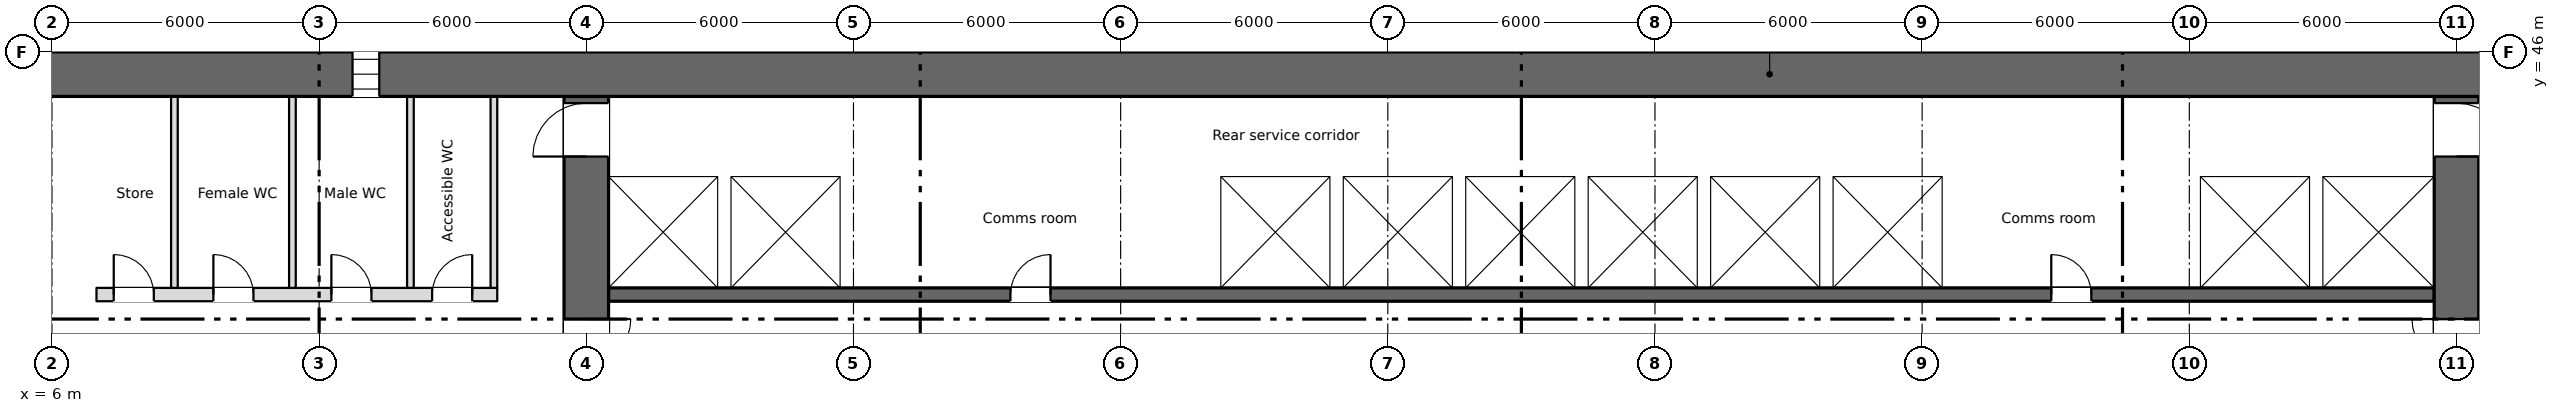
"""IFC4 building model, lengths in metres.
Left out: names, types, materials, properties, quantities, classifications, styles, units other than length and angle.
Written with IfcOpenShell. Run it as: python <this file> out.ifc"""

import sys

from ifc_helpers import new_model, si_unit, direction, frame, frame_2d, origin, place, context, subcontext, project, spatial, rectangle, extrude, element, fill, save


model = new_model("IFC4")
c1 = context("Model", 3, precision=1e-05, world=origin(), true_north=direction((0.0, 1.0)))
c2 = subcontext(c1, "Body", "Model", "MODEL_VIEW")
j1 = project(units=[si_unit("LENGTHUNIT", "METRE"), si_unit("PLANEANGLEUNIT", "RADIAN")], contexts=[c1])
p1 = place(None, origin())
s1 = spatial("IfcSite", under=j1, at=p1, CompositionType="ELEMENT")
p2 = place(p1, origin())
s2 = spatial("IfcBuilding", under=s1, at=p2, CompositionType="ELEMENT")
p3 = place(p2, frame((0.0, 0.0, 30.0)))
s3 = spatial("IfcBuildingStorey", under=s2, at=p3, CompositionType="ELEMENT", Elevation=30.0)
p4 = place(p3, frame((5.55, 45.5, 0.0), z_axis=(0.0, 0.0, 1.0), x_axis=(1.0, 0.0, 0.0)))
e1 = element("IfcWall", 1, at=p4, inside=s3, PredefinedType="SHEAR", context=c2, shape_type="SweptSolid", body=[
    extrude(rectangle(XDim=66.9, YDim=1.0, at=frame_2d((33.45, 0.0))), origin(), (0.0, 0.0, 1.0), 3.35),
])
p5 = place(p4, frame((7.2, 0.0, 0.6)))
e2 = element("IfcOpeningElement", 2, at=p5, cuts=e1, PredefinedType="OPENING", context=c2, shape_type="SweptSolid", body=[
    extrude(rectangle(XDim=0.6, YDim=2.4, at=frame_2d((0.3, 1.2))), frame((0.0, 0.51, 0.0), z_axis=(0.0, -1.0, 0.0), x_axis=(1.0, 0.0, 0.0)), (0.0, 0.0, 1.0), 1.02),
])
p6 = place(p4, frame((61.2, 0.0, 0.6)))
e3 = element("IfcOpeningElement", 3, at=p6, cuts=e1, PredefinedType="OPENING", context=c2, shape_type="SweptSolid", body=[
    extrude(rectangle(XDim=0.6, YDim=2.4, at=frame_2d((0.3, 1.2))), frame((0.0, 0.51, 0.0), z_axis=(0.0, -1.0, 0.0), x_axis=(1.0, 0.0, 0.0)), (0.0, 0.0, 1.0), 1.02),
])
p7 = place(p3, frame((6.85, 28.4, 0.0), z_axis=(0.0, 0.0, 1.0), x_axis=(0.0, 1.0, 0.0)))
e4 = element("IfcWall", 4, at=p7, inside=s3, PredefinedType="SHEAR", context=c2, shape_type="SweptSolid", body=[
    extrude(rectangle(XDim=16.6, YDim=0.3, at=frame_2d((8.3, 0.0))), origin(), (0.0, 0.0, 1.0), 3.35),
])
p8 = place(p3, frame((18.0, 28.4, 0.0), z_axis=(0.0, 0.0, 1.0), x_axis=(0.0, 1.0, 0.0)))
e5 = element("IfcWall", 5, at=p8, inside=s3, PredefinedType="SHEAR", context=c2, shape_type="SweptSolid", body=[
    extrude(rectangle(XDim=16.6, YDim=1.0, at=frame_2d((8.3, 0.0))), origin(), (0.0, 0.0, 1.0), 3.35),
])
p9 = place(p8, frame((9.6, 0.0, 0.0)))
e6 = element("IfcOpeningElement", 6, at=p9, cuts=e5, PredefinedType="OPENING", context=c2, shape_type="SweptSolid", body=[
    extrude(rectangle(XDim=2.0, YDim=2.1, at=frame_2d((1.0, 1.05))), frame((0.0, 0.51, 0.0), z_axis=(0.0, -1.0, 0.0), x_axis=(1.0, 0.0, 0.0)), (0.0, 0.0, 1.0), 1.02),
])
p10 = place(p8, frame((15.25, 0.0, 0.0)))
e7 = element("IfcOpeningElement", 7, at=p10, cuts=e5, PredefinedType="OPENING", context=c2, shape_type="SweptSolid", body=[
    extrude(rectangle(XDim=1.2, YDim=2.1, at=frame_2d((0.6, 1.05))), frame((0.0, 0.51, 0.0), z_axis=(0.0, -1.0, 0.0), x_axis=(1.0, 0.0, 0.0)), (0.0, 0.0, 1.0), 1.02),
])
p11 = place(p3, frame((60.0, 28.4, 0.0), z_axis=(0.0, 0.0, 1.0), x_axis=(0.0, 1.0, 0.0)))
e8 = element("IfcWall", 8, at=p11, inside=s3, PredefinedType="SHEAR", context=c2, shape_type="SweptSolid", body=[
    extrude(rectangle(XDim=16.6, YDim=1.0, at=frame_2d((8.3, 0.0))), origin(), (0.0, 0.0, 1.0), 3.35),
])
p12 = place(p11, frame((9.6, 0.0, 0.0)))
e9 = element("IfcOpeningElement", 9, at=p12, cuts=e8, PredefinedType="OPENING", context=c2, shape_type="SweptSolid", body=[
    extrude(rectangle(XDim=2.0, YDim=2.1, at=frame_2d((1.0, 1.05))), frame((0.0, 0.51, 0.0), z_axis=(0.0, -1.0, 0.0), x_axis=(1.0, 0.0, 0.0)), (0.0, 0.0, 1.0), 1.02),
])
p13 = place(p11, frame((15.25, 0.0, 0.0)))
e10 = element("IfcOpeningElement", 10, at=p13, cuts=e8, PredefinedType="OPENING", context=c2, shape_type="SweptSolid", body=[
    extrude(rectangle(XDim=1.2, YDim=2.1, at=frame_2d((0.6, 1.05))), frame((0.0, 0.51, 0.0), z_axis=(0.0, -1.0, 0.0), x_axis=(1.0, 0.0, 0.0)), (0.0, 0.0, 1.0), 1.02),
])
p14 = place(p3, frame((18.5, 40.55, 0.0), z_axis=(0.0, 0.0, 1.0), x_axis=(1.0, 0.0, 0.0)))
e11 = element("IfcWall", 11, at=p14, inside=s3, PredefinedType="SHEAR", context=c2, shape_type="SweptSolid", body=[
    extrude(rectangle(XDim=41.0, YDim=0.3, at=frame_2d((20.5, 0.0))), origin(), (0.0, 0.0, 1.0), 3.35),
])
p15 = place(p14, frame((9.025, 0.0, 0.0)))
e12 = element("IfcOpeningElement", 12, at=p15, cuts=e11, PredefinedType="OPENING", context=c2, shape_type="SweptSolid", body=[
    extrude(rectangle(XDim=0.9, YDim=2.1, at=frame_2d((0.45, 1.05))), frame((0.0, 0.16, 0.0), z_axis=(0.0, -1.0, 0.0), x_axis=(1.0, 0.0, 0.0)), (0.0, 0.0, 1.0), 0.32),
])
p16 = place(p14, frame((32.4, 0.0, 0.0)))
e13 = element("IfcOpeningElement", 13, at=p16, cuts=e11, PredefinedType="OPENING", context=c2, shape_type="SweptSolid", body=[
    extrude(rectangle(XDim=0.9, YDim=2.1, at=frame_2d((0.45, 1.05))), frame((0.0, 0.16, 0.0), z_axis=(0.0, -1.0, 0.0), x_axis=(1.0, 0.0, 0.0)), (0.0, 0.0, 1.0), 0.32),
])
p17 = place(p14, frame((14.425, 0.0, 0.0)))
e14 = element("IfcOpeningElement", 14, at=p17, cuts=e11, PredefinedType="OPENING", context=c2, shape_type="SweptSolid", body=[
    extrude(rectangle(XDim=1.1, YDim=2.1, at=frame_2d((0.55, 1.05))), frame((0.0, 0.16, 0.0), z_axis=(0.0, -1.0, 0.0), x_axis=(1.0, 0.0, 0.0)), (0.0, 0.0, 1.0), 0.32),
])
p18 = place(p14, frame((17.175, 0.0, 0.0)))
e15 = element("IfcOpeningElement", 15, at=p18, cuts=e11, PredefinedType="OPENING", context=c2, shape_type="SweptSolid", body=[
    extrude(rectangle(XDim=1.1, YDim=2.1, at=frame_2d((0.55, 1.05))), frame((0.0, 0.16, 0.0), z_axis=(0.0, -1.0, 0.0), x_axis=(1.0, 0.0, 0.0)), (0.0, 0.0, 1.0), 0.32),
])
p19 = place(p14, frame((19.925, 0.0, 0.0)))
e16 = element("IfcOpeningElement", 16, at=p19, cuts=e11, PredefinedType="OPENING", context=c2, shape_type="SweptSolid", body=[
    extrude(rectangle(XDim=1.1, YDim=2.1, at=frame_2d((0.55, 1.05))), frame((0.0, 0.16, 0.0), z_axis=(0.0, -1.0, 0.0), x_axis=(1.0, 0.0, 0.0)), (0.0, 0.0, 1.0), 0.32),
])
p20 = place(p14, frame((22.675, 0.0, 0.0)))
e17 = element("IfcOpeningElement", 17, at=p20, cuts=e11, PredefinedType="OPENING", context=c2, shape_type="SweptSolid", body=[
    extrude(rectangle(XDim=1.1, YDim=2.1, at=frame_2d((0.55, 1.05))), frame((0.0, 0.16, 0.0), z_axis=(0.0, -1.0, 0.0), x_axis=(1.0, 0.0, 0.0)), (0.0, 0.0, 1.0), 0.32),
])
p21 = place(p14, frame((36.375, 0.0, 0.0)))
e18 = element("IfcOpeningElement", 18, at=p21, cuts=e11, PredefinedType="OPENING", context=c2, shape_type="SweptSolid", body=[
    extrude(rectangle(XDim=1.2, YDim=2.1, at=frame_2d((0.6, 1.05))), frame((0.0, 0.16, 0.0), z_axis=(0.0, -1.0, 0.0), x_axis=(1.0, 0.0, 0.0)), (0.0, 0.0, 1.0), 0.32),
])
p22 = place(p14, frame((39.15, 0.0, 0.0)))
e19 = element("IfcOpeningElement", 19, at=p22, cuts=e11, PredefinedType="OPENING", context=c2, shape_type="SweptSolid", body=[
    extrude(rectangle(XDim=1.2, YDim=2.1, at=frame_2d((0.6, 1.05))), frame((0.0, 0.16, 0.0), z_axis=(0.0, -1.0, 0.0), x_axis=(1.0, 0.0, 0.0)), (0.0, 0.0, 1.0), 0.32),
])
p23 = place(p3, frame((18.5, 43.35, 0.0), z_axis=(0.0, 0.0, 1.0), x_axis=(1.0, 0.0, 0.0)))
e20 = element("IfcWall", 20, at=p23, inside=s3, PredefinedType="SHEAR", context=c2, shape_type="SweptSolid", body=[
    extrude(rectangle(XDim=41.0, YDim=0.3, at=frame_2d((20.5, 0.0))), origin(), (0.0, 0.0, 1.0), 3.35),
])
p24 = place(p3, frame((7.0, 40.55, 0.0), z_axis=(0.0, 0.0, 1.0), x_axis=(1.0, 0.0, 0.0)))
e21 = element("IfcWall", 21, at=p24, inside=s3, PredefinedType="PARTITIONING", context=c2, shape_type="SweptSolid", body=[
    extrude(rectangle(XDim=9.0, YDim=0.3, at=frame_2d((4.5, 0.0))), origin(), (0.0, 0.0, 1.0), 3.35),
])
p25 = place(p24, frame((0.387, 0.0, 0.0)))
e22 = element("IfcOpeningElement", 22, at=p25, cuts=e21, PredefinedType="OPENING", context=c2, shape_type="SweptSolid", body=[
    extrude(rectangle(XDim=0.9, YDim=2.1, at=frame_2d((0.45, 1.05))), frame((0.0, 0.16, 0.0), z_axis=(0.0, -1.0, 0.0), x_axis=(1.0, 0.0, 0.0)), (0.0, 0.0, 1.0), 0.32),
])
p26 = place(p24, frame((2.625, 0.0, 0.0)))
e23 = element("IfcOpeningElement", 23, at=p26, cuts=e21, PredefinedType="OPENING", context=c2, shape_type="SweptSolid", body=[
    extrude(rectangle(XDim=0.9, YDim=2.1, at=frame_2d((0.45, 1.05))), frame((0.0, 0.16, 0.0), z_axis=(0.0, -1.0, 0.0), x_axis=(1.0, 0.0, 0.0)), (0.0, 0.0, 1.0), 0.32),
])
p27 = place(p24, frame((5.275, 0.0, 0.0)))
e24 = element("IfcOpeningElement", 24, at=p27, cuts=e21, PredefinedType="OPENING", context=c2, shape_type="SweptSolid", body=[
    extrude(rectangle(XDim=0.9, YDim=2.1, at=frame_2d((0.45, 1.05))), frame((0.0, 0.16, 0.0), z_axis=(0.0, -1.0, 0.0), x_axis=(1.0, 0.0, 0.0)), (0.0, 0.0, 1.0), 0.32),
])
p28 = place(p24, frame((7.538, 0.0, 0.0)))
e25 = element("IfcOpeningElement", 25, at=p28, cuts=e21, PredefinedType="OPENING", context=c2, shape_type="SweptSolid", body=[
    extrude(rectangle(XDim=0.9, YDim=2.1, at=frame_2d((0.45, 1.05))), frame((0.0, 0.16, 0.0), z_axis=(0.0, -1.0, 0.0), x_axis=(1.0, 0.0, 0.0)), (0.0, 0.0, 1.0), 0.32),
])
for number, where, z_axis, x_axis in (
    (26, (21.1, 40.7, 0.0), (0.0, 0.0, 1.0), (0.0, 1.0, 0.0)),
    (27, (23.85, 40.7, 0.0), (0.0, 0.0, 1.0), (0.0, 1.0, 0.0)),
    (28, (32.1, 40.7, 0.0), (0.0, 0.0, 1.0), (0.0, 1.0, 0.0)),
    (29, (34.85, 40.7, 0.0), (0.0, 0.0, 1.0), (0.0, 1.0, 0.0)),
    (30, (37.6, 40.7, 0.0), (0.0, 0.0, 1.0), (0.0, 1.0, 0.0)),
    (31, (40.35, 40.7, 0.0), (0.0, 0.0, 1.0), (0.0, 1.0, 0.0)),
    (32, (43.1, 40.7, 0.0), (0.0, 0.0, 1.0), (0.0, 1.0, 0.0)),
    (33, (45.85, 40.7, 0.0), (0.0, 0.0, 1.0), (0.0, 1.0, 0.0)),
    (34, (48.6, 40.7, 0.0), (0.0, 0.0, 1.0), (0.0, 1.0, 0.0)),
    (35, (54.1, 40.7, 0.0), (0.0, 0.0, 1.0), (0.0, 1.0, 0.0)),
    (36, (56.85, 40.7, 0.0), (0.0, 0.0, 1.0), (0.0, 1.0, 0.0)),
):
    element("IfcWall", number, at=place(p3, frame(where, z_axis=z_axis, x_axis=x_axis)), inside=s3, PredefinedType="SHEAR", context=c2, shape_type="SweptSolid", body=[
        extrude(rectangle(XDim=2.5, YDim=0.3, at=frame_2d((1.25, 0.0))), origin(), (0.0, 0.0, 1.0), 3.35),
    ])
for number, where, z_axis, x_axis in (
    (37, (15.925, 40.7, 0.0), (0.0, 0.0, 1.0), (0.0, 1.0, 0.0)),
    (38, (8.75, 40.7, 0.0), (0.0, 0.0, 1.0), (0.0, 1.0, 0.0)),
    (39, (11.4, 40.7, 0.0), (0.0, 0.0, 1.0), (0.0, 1.0, 0.0)),
    (40, (14.05, 40.7, 0.0), (0.0, 0.0, 1.0), (0.0, 1.0, 0.0)),
):
    element("IfcWall", number, at=place(p3, frame(where, z_axis=z_axis, x_axis=x_axis)), inside=s3, PredefinedType="PARTITIONING", context=c2, shape_type="SweptSolid", body=[
        extrude(rectangle(XDim=4.3, YDim=0.15, at=frame_2d((2.15, 0.0))), origin(), (0.0, 0.0, 1.0), 3.35),
    ])
p29 = place(p5, origin())
e41 = element("IfcWindow", 41, at=p29, inside=s3, PartitioningType="SINGLE_PANEL", PredefinedType="WINDOW", context=c2, shape_type="SweptSolid", body=[
    extrude(rectangle(XDim=0.6, YDim=2.4, at=frame_2d((0.3, 1.2))), frame((0.0, 0.03, 0.0), z_axis=(0.0, -1.0, 0.0), x_axis=(1.0, 0.0, 0.0)), (0.0, 0.0, 1.0), 0.06),
])
fill(e2, e41)
p30 = place(p25, origin())
e42 = element("IfcDoor", 42, at=p30, inside=s3, OperationType="SINGLE_SWING_LEFT", PredefinedType="DOOR", context=c2, shape_type="SweptSolid", body=[
    extrude(rectangle(XDim=0.9, YDim=2.1, at=frame_2d((0.45, 1.05))), frame((0.0, 0.025, 0.0), z_axis=(0.0, -1.0, 0.0), x_axis=(1.0, 0.0, 0.0)), (0.0, 0.0, 1.0), 0.05),
])
fill(e22, e42)
p31 = place(p26, origin())
e43 = element("IfcDoor", 43, at=p31, inside=s3, OperationType="SINGLE_SWING_LEFT", PredefinedType="DOOR", context=c2, shape_type="SweptSolid", body=[
    extrude(rectangle(XDim=0.9, YDim=2.1, at=frame_2d((0.45, 1.05))), frame((0.0, 0.025, 0.0), z_axis=(0.0, -1.0, 0.0), x_axis=(1.0, 0.0, 0.0)), (0.0, 0.0, 1.0), 0.05),
])
fill(e23, e43)
p32 = place(p27, origin())
e44 = element("IfcDoor", 44, at=p32, inside=s3, OperationType="SINGLE_SWING_LEFT", PredefinedType="DOOR", context=c2, shape_type="SweptSolid", body=[
    extrude(rectangle(XDim=0.9, YDim=2.1, at=frame_2d((0.45, 1.05))), frame((0.0, 0.025, 0.0), z_axis=(0.0, -1.0, 0.0), x_axis=(1.0, 0.0, 0.0)), (0.0, 0.0, 1.0), 0.05),
])
fill(e24, e44)
p33 = place(p28, origin())
e45 = element("IfcDoor", 45, at=p33, inside=s3, OperationType="SINGLE_SWING_RIGHT", PredefinedType="DOOR", context=c2, shape_type="SweptSolid", body=[
    extrude(rectangle(XDim=0.9, YDim=2.1, at=frame_2d((0.45, 1.05))), frame((0.0, 0.025, 0.0), z_axis=(0.0, -1.0, 0.0), x_axis=(1.0, 0.0, 0.0)), (0.0, 0.0, 1.0), 0.05),
])
fill(e25, e45)
p34 = place(p15, origin())
e46 = element("IfcDoor", 46, at=p34, inside=s3, OperationType="SINGLE_SWING_RIGHT", PredefinedType="DOOR", context=c2, shape_type="SweptSolid", body=[
    extrude(rectangle(XDim=0.9, YDim=2.1, at=frame_2d((0.45, 1.05))), frame((0.0, 0.025, 0.0), z_axis=(0.0, -1.0, 0.0), x_axis=(1.0, 0.0, 0.0)), (0.0, 0.0, 1.0), 0.05),
])
fill(e12, e46)
p35 = place(p16, origin())
e47 = element("IfcDoor", 47, at=p35, inside=s3, OperationType="SINGLE_SWING_LEFT", PredefinedType="DOOR", context=c2, shape_type="SweptSolid", body=[
    extrude(rectangle(XDim=0.9, YDim=2.1, at=frame_2d((0.45, 1.05))), frame((0.0, 0.025, 0.0), z_axis=(0.0, -1.0, 0.0), x_axis=(1.0, 0.0, 0.0)), (0.0, 0.0, 1.0), 0.05),
])
fill(e13, e47)
p36 = place(p17, origin())
e48 = element("IfcDoor", 48, at=p36, inside=s3, OperationType="SLIDING_TO_LEFT", PredefinedType="DOOR", context=c2, shape_type="SweptSolid", body=[
    extrude(rectangle(XDim=1.1, YDim=2.1, at=frame_2d((0.55, 1.05))), frame((0.0, 0.025, 0.0), z_axis=(0.0, -1.0, 0.0), x_axis=(1.0, 0.0, 0.0)), (0.0, 0.0, 1.0), 0.05),
])
fill(e14, e48)
p37 = place(p18, origin())
e49 = element("IfcDoor", 49, at=p37, inside=s3, OperationType="SLIDING_TO_LEFT", PredefinedType="DOOR", context=c2, shape_type="SweptSolid", body=[
    extrude(rectangle(XDim=1.1, YDim=2.1, at=frame_2d((0.55, 1.05))), frame((0.0, 0.025, 0.0), z_axis=(0.0, -1.0, 0.0), x_axis=(1.0, 0.0, 0.0)), (0.0, 0.0, 1.0), 0.05),
])
fill(e15, e49)
p38 = place(p19, origin())
e50 = element("IfcDoor", 50, at=p38, inside=s3, OperationType="SLIDING_TO_LEFT", PredefinedType="DOOR", context=c2, shape_type="SweptSolid", body=[
    extrude(rectangle(XDim=1.1, YDim=2.1, at=frame_2d((0.55, 1.05))), frame((0.0, 0.025, 0.0), z_axis=(0.0, -1.0, 0.0), x_axis=(1.0, 0.0, 0.0)), (0.0, 0.0, 1.0), 0.05),
])
fill(e16, e50)
p39 = place(p20, origin())
e51 = element("IfcDoor", 51, at=p39, inside=s3, OperationType="SLIDING_TO_LEFT", PredefinedType="DOOR", context=c2, shape_type="SweptSolid", body=[
    extrude(rectangle(XDim=1.1, YDim=2.1, at=frame_2d((0.55, 1.05))), frame((0.0, 0.025, 0.0), z_axis=(0.0, -1.0, 0.0), x_axis=(1.0, 0.0, 0.0)), (0.0, 0.0, 1.0), 0.05),
])
fill(e17, e51)
p40 = place(p21, origin())
e52 = element("IfcDoor", 52, at=p40, inside=s3, OperationType="SLIDING_TO_LEFT", PredefinedType="DOOR", context=c2, shape_type="SweptSolid", body=[
    extrude(rectangle(XDim=1.2, YDim=2.1, at=frame_2d((0.6, 1.05))), frame((0.0, 0.025, 0.0), z_axis=(0.0, -1.0, 0.0), x_axis=(1.0, 0.0, 0.0)), (0.0, 0.0, 1.0), 0.05),
])
fill(e18, e52)
p41 = place(p22, origin())
e53 = element("IfcDoor", 53, at=p41, inside=s3, OperationType="SLIDING_TO_LEFT", PredefinedType="DOOR", context=c2, shape_type="SweptSolid", body=[
    extrude(rectangle(XDim=1.2, YDim=2.1, at=frame_2d((0.6, 1.05))), frame((0.0, 0.025, 0.0), z_axis=(0.0, -1.0, 0.0), x_axis=(1.0, 0.0, 0.0)), (0.0, 0.0, 1.0), 0.05),
])
fill(e19, e53)
p42 = place(p9, origin())
e54 = element("IfcDoor", 54, at=p42, inside=s3, OperationType="DOUBLE_DOOR_SINGLE_SWING", PredefinedType="DOOR", context=c2, shape_type="SweptSolid", body=[
    extrude(rectangle(XDim=2.0, YDim=2.1, at=frame_2d((1.0, 1.05))), frame((0.0, 0.025, 0.0), z_axis=(0.0, -1.0, 0.0), x_axis=(1.0, 0.0, 0.0)), (0.0, 0.0, 1.0), 0.05),
])
fill(e6, e54)
p43 = place(p12, origin())
e55 = element("IfcDoor", 55, at=p43, inside=s3, OperationType="DOUBLE_DOOR_SINGLE_SWING", PredefinedType="DOOR", context=c2, shape_type="SweptSolid", body=[
    extrude(rectangle(XDim=2.0, YDim=2.1, at=frame_2d((1.0, 1.05))), frame((0.0, 0.025, 0.0), z_axis=(0.0, -1.0, 0.0), x_axis=(1.0, 0.0, 0.0)), (0.0, 0.0, 1.0), 0.05),
])
fill(e9, e55)
p44 = place(p10, origin())
e56 = element("IfcDoor", 56, at=p44, inside=s3, OperationType="SINGLE_SWING_LEFT", PredefinedType="DOOR", context=c2, shape_type="SweptSolid", body=[
    extrude(rectangle(XDim=1.2, YDim=2.1, at=frame_2d((0.6, 1.05))), frame((0.0, 0.025, 0.0), z_axis=(0.0, -1.0, 0.0), x_axis=(1.0, 0.0, 0.0)), (0.0, 0.0, 1.0), 0.05),
])
fill(e7, e56)
p45 = place(p13, origin())
e57 = element("IfcDoor", 57, at=p45, inside=s3, OperationType="SINGLE_SWING_LEFT", PredefinedType="DOOR", context=c2, shape_type="SweptSolid", body=[
    extrude(rectangle(XDim=1.2, YDim=2.1, at=frame_2d((0.6, 1.05))), frame((0.0, 0.025, 0.0), z_axis=(0.0, -1.0, 0.0), x_axis=(1.0, 0.0, 0.0)), (0.0, 0.0, 1.0), 0.05),
])
fill(e10, e57)
save(model, sys.argv[1])
